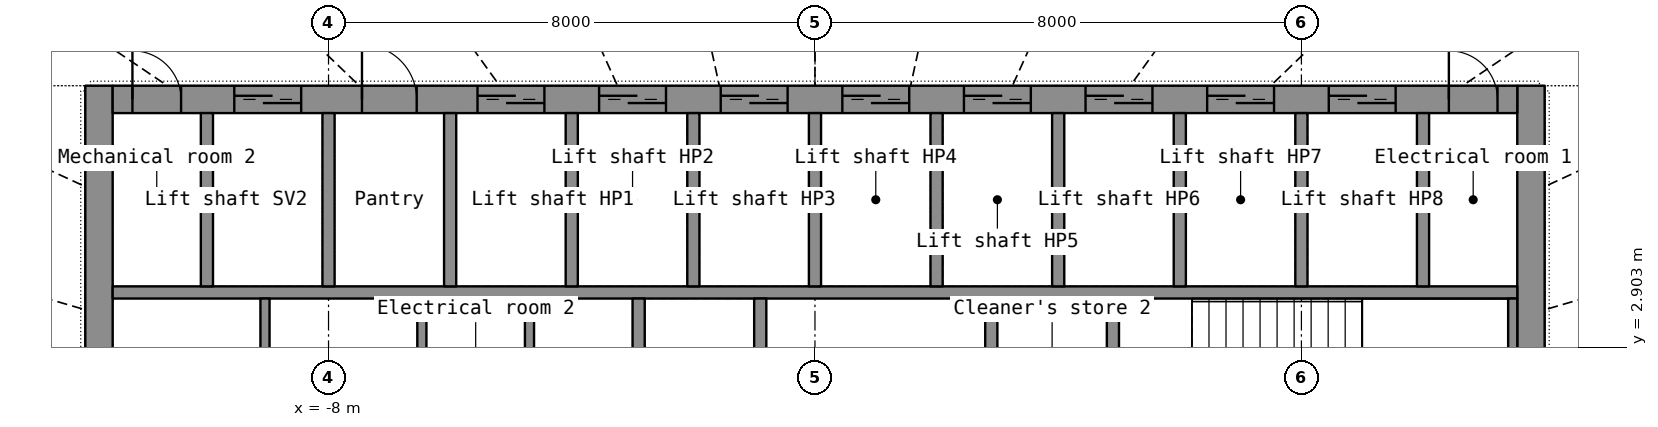
"""IFC4 building model, lengths in metres.
Left out: names, types, materials, properties, quantities, classifications, styles, units other than length and angle.
Written with IfcOpenShell. Run it as: python <this file> out.ifc"""

import sys

from ifc_helpers import new_model, si_unit, direction, frame, frame_2d, origin, place, context, subcontext, project, spatial, rectangle, extrude, element, fill, save


model = new_model("IFC4")
c1 = context("Model", 3, precision=1e-05, world=origin(), true_north=direction((0.0, 1.0)))
c2 = subcontext(c1, "Body", "Model", "MODEL_VIEW")
j1 = project(units=[si_unit("LENGTHUNIT", "METRE"), si_unit("PLANEANGLEUNIT", "RADIAN")], contexts=[c1])
p1 = place(None, origin())
s1 = spatial("IfcSite", under=j1, at=p1, CompositionType="ELEMENT")
p2 = place(p1, origin())
s2 = spatial("IfcBuilding", under=s1, at=p2, CompositionType="ELEMENT")
p3 = place(p2, frame((0.0, 0.0, 201.5)))
s3 = spatial("IfcBuildingStorey", under=s2, at=p3, CompositionType="ELEMENT", Elevation=201.5)
p4 = place(p3, frame((-11.775, -7.2, 0.0), z_axis=(0.0, 0.0, 1.0), x_axis=(0.0, 1.0, 0.0)))
e1 = element("IfcWall", 1, at=p4, inside=s3, PredefinedType="SHEAR", context=c2, shape_type="SweptSolid", body=[
    extrude(rectangle(XDim=14.4, YDim=0.45, at=frame_2d((7.2, 0.0))), origin(), (0.0, 0.0, 1.0), 3.3),
])
p5 = place(p4, frame((6.5, 0.0, 0.0)))
e2 = element("IfcOpeningElement", 2, at=p5, cuts=e1, PredefinedType="OPENING", context=c2, shape_type="SweptSolid", body=[
    extrude(rectangle(XDim=1.4, YDim=2.2, at=frame_2d((0.7, 1.1))), frame((0.0, 0.235, 0.0), z_axis=(0.0, -1.0, 0.0), x_axis=(1.0, 0.0, 0.0)), (0.0, 0.0, 1.0), 0.47),
])
p6 = place(p3, frame((11.775, -7.2, 0.0), z_axis=(0.0, 0.0, 1.0), x_axis=(0.0, 1.0, 0.0)))
e3 = element("IfcWall", 3, at=p6, inside=s3, PredefinedType="SHEAR", context=c2, shape_type="SweptSolid", body=[
    extrude(rectangle(XDim=14.4, YDim=0.45, at=frame_2d((7.2, 0.0))), origin(), (0.0, 0.0, 1.0), 3.3),
])
p7 = place(p6, frame((6.5, 0.0, 0.0)))
e4 = element("IfcOpeningElement", 4, at=p7, cuts=e3, PredefinedType="OPENING", context=c2, shape_type="SweptSolid", body=[
    extrude(rectangle(XDim=1.4, YDim=2.2, at=frame_2d((0.7, 1.1))), frame((0.0, 0.235, 0.0), z_axis=(0.0, -1.0, 0.0), x_axis=(1.0, 0.0, 0.0)), (0.0, 0.0, 1.0), 0.47),
])
p8 = place(p3, frame((-11.55, 6.975, 0.0), z_axis=(0.0, 0.0, 1.0), x_axis=(1.0, 0.0, 0.0)))
e5 = element("IfcWall", 5, at=p8, inside=s3, PredefinedType="SHEAR", context=c2, shape_type="SweptSolid", body=[
    extrude(rectangle(XDim=23.1, YDim=0.45, at=frame_2d((11.55, 0.0))), origin(), (0.0, 0.0, 1.0), 3.3),
])
p9 = place(p8, frame((2.0, 0.0, 0.0)))
e6 = element("IfcOpeningElement", 6, at=p9, cuts=e5, PredefinedType="OPENING", context=c2, shape_type="SweptSolid", body=[
    extrude(rectangle(XDim=1.1, YDim=2.2, at=frame_2d((0.55, 1.1))), frame((0.0, 0.235, 0.0), z_axis=(0.0, -1.0, 0.0), x_axis=(1.0, 0.0, 0.0)), (0.0, 0.0, 1.0), 0.47),
])
p10 = place(p8, frame((6.0, 0.0, 0.0)))
e7 = element("IfcOpeningElement", 7, at=p10, cuts=e5, PredefinedType="OPENING", context=c2, shape_type="SweptSolid", body=[
    extrude(rectangle(XDim=1.1, YDim=2.2, at=frame_2d((0.55, 1.1))), frame((0.0, 0.235, 0.0), z_axis=(0.0, -1.0, 0.0), x_axis=(1.0, 0.0, 0.0)), (0.0, 0.0, 1.0), 0.47),
])
p11 = place(p8, frame((8.0, 0.0, 0.0)))
e8 = element("IfcOpeningElement", 8, at=p11, cuts=e5, PredefinedType="OPENING", context=c2, shape_type="SweptSolid", body=[
    extrude(rectangle(XDim=1.1, YDim=2.2, at=frame_2d((0.55, 1.1))), frame((0.0, 0.235, 0.0), z_axis=(0.0, -1.0, 0.0), x_axis=(1.0, 0.0, 0.0)), (0.0, 0.0, 1.0), 0.47),
])
p12 = place(p8, frame((10.0, 0.0, 0.0)))
e9 = element("IfcOpeningElement", 9, at=p12, cuts=e5, PredefinedType="OPENING", context=c2, shape_type="SweptSolid", body=[
    extrude(rectangle(XDim=1.1, YDim=2.2, at=frame_2d((0.55, 1.1))), frame((0.0, 0.235, 0.0), z_axis=(0.0, -1.0, 0.0), x_axis=(1.0, 0.0, 0.0)), (0.0, 0.0, 1.0), 0.47),
])
p13 = place(p8, frame((12.0, 0.0, 0.0)))
e10 = element("IfcOpeningElement", 10, at=p13, cuts=e5, PredefinedType="OPENING", context=c2, shape_type="SweptSolid", body=[
    extrude(rectangle(XDim=1.1, YDim=2.2, at=frame_2d((0.55, 1.1))), frame((0.0, 0.235, 0.0), z_axis=(0.0, -1.0, 0.0), x_axis=(1.0, 0.0, 0.0)), (0.0, 0.0, 1.0), 0.47),
])
p14 = place(p8, frame((14.0, 0.0, 0.0)))
e11 = element("IfcOpeningElement", 11, at=p14, cuts=e5, PredefinedType="OPENING", context=c2, shape_type="SweptSolid", body=[
    extrude(rectangle(XDim=1.1, YDim=2.2, at=frame_2d((0.55, 1.1))), frame((0.0, 0.235, 0.0), z_axis=(0.0, -1.0, 0.0), x_axis=(1.0, 0.0, 0.0)), (0.0, 0.0, 1.0), 0.47),
])
p15 = place(p8, frame((16.0, 0.0, 0.0)))
e12 = element("IfcOpeningElement", 12, at=p15, cuts=e5, PredefinedType="OPENING", context=c2, shape_type="SweptSolid", body=[
    extrude(rectangle(XDim=1.1, YDim=2.2, at=frame_2d((0.55, 1.1))), frame((0.0, 0.235, 0.0), z_axis=(0.0, -1.0, 0.0), x_axis=(1.0, 0.0, 0.0)), (0.0, 0.0, 1.0), 0.47),
])
p16 = place(p8, frame((18.0, 0.0, 0.0)))
e13 = element("IfcOpeningElement", 13, at=p16, cuts=e5, PredefinedType="OPENING", context=c2, shape_type="SweptSolid", body=[
    extrude(rectangle(XDim=1.1, YDim=2.2, at=frame_2d((0.55, 1.1))), frame((0.0, 0.235, 0.0), z_axis=(0.0, -1.0, 0.0), x_axis=(1.0, 0.0, 0.0)), (0.0, 0.0, 1.0), 0.47),
])
p17 = place(p8, frame((20.0, 0.0, 0.0)))
e14 = element("IfcOpeningElement", 14, at=p17, cuts=e5, PredefinedType="OPENING", context=c2, shape_type="SweptSolid", body=[
    extrude(rectangle(XDim=1.1, YDim=2.2, at=frame_2d((0.55, 1.1))), frame((0.0, 0.235, 0.0), z_axis=(0.0, -1.0, 0.0), x_axis=(1.0, 0.0, 0.0)), (0.0, 0.0, 1.0), 0.47),
])
p18 = place(p8, frame((4.1, 0.0, 0.0)))
e15 = element("IfcOpeningElement", 15, at=p18, cuts=e5, PredefinedType="OPENING", context=c2, shape_type="SweptSolid", body=[
    extrude(rectangle(XDim=0.9, YDim=2.1, at=frame_2d((0.45, 1.05))), frame((0.0, 0.235, 0.0), z_axis=(0.0, -1.0, 0.0), x_axis=(1.0, 0.0, 0.0)), (0.0, 0.0, 1.0), 0.47),
])
p19 = place(p8, frame((0.325, 0.0, 0.0)))
e16 = element("IfcOpeningElement", 16, at=p19, cuts=e5, PredefinedType="OPENING", context=c2, shape_type="SweptSolid", body=[
    extrude(rectangle(XDim=0.8, YDim=2.05, at=frame_2d((0.4, 1.025))), frame((0.0, 0.235, 0.0), z_axis=(0.0, -1.0, 0.0), x_axis=(1.0, 0.0, 0.0)), (0.0, 0.0, 1.0), 0.47),
])
p20 = place(p8, frame((21.975, 0.0, 0.0)))
e17 = element("IfcOpeningElement", 17, at=p20, cuts=e5, PredefinedType="OPENING", context=c2, shape_type="SweptSolid", body=[
    extrude(rectangle(XDim=0.8, YDim=2.05, at=frame_2d((0.4, 1.025))), frame((0.0, 0.235, 0.0), z_axis=(0.0, -1.0, 0.0), x_axis=(1.0, 0.0, 0.0)), (0.0, 0.0, 1.0), 0.47),
])
p21 = place(p3, frame((-11.55, 3.8, 0.0), z_axis=(0.0, 0.0, 1.0), x_axis=(1.0, 0.0, 0.0)))
e18 = element("IfcWall", 18, at=p21, inside=s3, PredefinedType="SHEAR", context=c2, shape_type="SweptSolid", body=[
    extrude(rectangle(XDim=23.1, YDim=0.2, at=frame_2d((11.55, 0.0))), origin(), (0.0, 0.0, 1.0), 3.3),
])
for number, where, z_axis, x_axis in (
    (19, (-10.0, 3.9, 0.0), (0.0, 0.0, 1.0), (0.0, 1.0, 0.0)),
    (20, (-8.0, 3.9, 0.0), (0.0, 0.0, 1.0), (0.0, 1.0, 0.0)),
    (21, (-6.0, 3.9, 0.0), (0.0, 0.0, 1.0), (0.0, 1.0, 0.0)),
    (22, (-4.0, 3.9, 0.0), (0.0, 0.0, 1.0), (0.0, 1.0, 0.0)),
    (23, (-2.0, 3.9, 0.0), (0.0, 0.0, 1.0), (0.0, 1.0, 0.0)),
    (24, (0.0, 3.9, 0.0), (0.0, 0.0, 1.0), (0.0, 1.0, 0.0)),
    (25, (2.0, 3.9, 0.0), (0.0, 0.0, 1.0), (0.0, 1.0, 0.0)),
    (26, (4.0, 3.9, 0.0), (0.0, 0.0, 1.0), (0.0, 1.0, 0.0)),
    (27, (6.0, 3.9, 0.0), (0.0, 0.0, 1.0), (0.0, 1.0, 0.0)),
    (28, (8.0, 3.9, 0.0), (0.0, 0.0, 1.0), (0.0, 1.0, 0.0)),
    (29, (10.0, 3.9, 0.0), (0.0, 0.0, 1.0), (0.0, 1.0, 0.0)),
):
    element("IfcWall", number, at=place(p3, frame(where, z_axis=z_axis, x_axis=x_axis)), inside=s3, PredefinedType="SHEAR", context=c2, shape_type="SweptSolid", body=[
        extrude(rectangle(XDim=2.85, YDim=0.2, at=frame_2d((1.425, 0.0))), origin(), (0.0, 0.0, 1.0), 3.3),
    ])
p22 = place(p3, frame((-2.9, -3.7, 0.0), z_axis=(0.0, 0.0, 1.0), x_axis=(0.0, 1.0, 0.0)))
e30 = element("IfcWall", 30, at=p22, inside=s3, PredefinedType="SHEAR", context=c2, shape_type="SweptSolid", body=[
    extrude(rectangle(XDim=7.4, YDim=0.2, at=frame_2d((3.7, 0.0))), origin(), (0.0, 0.0, 1.0), 3.3),
])
p23 = place(p22, frame((3.1, 0.0, 0.0)))
e31 = element("IfcOpeningElement", 31, at=p23, cuts=e30, PredefinedType="OPENING", context=c2, shape_type="SweptSolid", body=[
    extrude(rectangle(XDim=1.2, YDim=2.2, at=frame_2d((0.6, 1.1))), frame((0.0, 0.11, 0.0), z_axis=(0.0, -1.0, 0.0), x_axis=(1.0, 0.0, 0.0)), (0.0, 0.0, 1.0), 0.22),
])
p24 = place(p3, frame((2.9, -3.7, 0.0), z_axis=(0.0, 0.0, 1.0), x_axis=(0.0, 1.0, 0.0)))
e32 = element("IfcWall", 32, at=p24, inside=s3, PredefinedType="SHEAR", context=c2, shape_type="SweptSolid", body=[
    extrude(rectangle(XDim=7.4, YDim=0.2, at=frame_2d((3.7, 0.0))), origin(), (0.0, 0.0, 1.0), 3.3),
])
p25 = place(p24, frame((3.1, 0.0, 0.0)))
e33 = element("IfcOpeningElement", 33, at=p25, cuts=e32, PredefinedType="OPENING", context=c2, shape_type="SweptSolid", body=[
    extrude(rectangle(XDim=1.2, YDim=2.2, at=frame_2d((0.6, 1.1))), frame((0.0, 0.11, 0.0), z_axis=(0.0, -1.0, 0.0), x_axis=(1.0, 0.0, 0.0)), (0.0, 0.0, 1.0), 0.22),
])
p26 = place(p3, frame((-0.9, 1.35, 0.0), z_axis=(0.0, 0.0, 1.0), x_axis=(0.0, 1.0, 0.0)))
e34 = element("IfcWall", 34, at=p26, inside=s3, PredefinedType="SHEAR", context=c2, shape_type="SweptSolid", body=[
    extrude(rectangle(XDim=2.35, YDim=0.2, at=frame_2d((1.175, 0.0))), origin(), (0.0, 0.0, 1.0), 3.3),
])
p27 = place(p3, frame((11.475, 1.35, 0.0), z_axis=(0.0, 0.0, 1.0), x_axis=(0.0, 1.0, 0.0)))
e35 = element("IfcWall", 35, at=p27, inside=s3, PredefinedType="SHEAR", context=c2, shape_type="SweptSolid", body=[
    extrude(rectangle(XDim=2.35, YDim=0.15, at=frame_2d((1.175, 0.0))), origin(), (0.0, 0.0, 1.0), 3.3),
])
p28 = place(p3, frame((4.9, 1.35, 0.0), z_axis=(0.0, 0.0, 1.0), x_axis=(0.0, 1.0, 0.0)))
e36 = element("IfcWall", 36, at=p28, inside=s3, PredefinedType="SHEAR", context=c2, shape_type="SweptSolid", body=[
    extrude(rectangle(XDim=2.35, YDim=0.2, at=frame_2d((1.175, 0.0))), origin(), (0.0, 0.0, 1.0), 3.3),
])
for number, where, z_axis, x_axis in (
    (37, (-9.045, 1.35, 0.0), (0.0, 0.0, 1.0), (0.0, 1.0, 0.0)),
    (38, (-6.465, 1.35, 0.0), (0.0, 0.0, 1.0), (0.0, 1.0, 0.0)),
    (39, (-4.695, 1.35, 0.0), (0.0, 0.0, 1.0), (0.0, 1.0, 0.0)),
):
    element("IfcWall", number, at=place(p3, frame(where, z_axis=z_axis, x_axis=x_axis)), inside=s3, PredefinedType="PARTITIONING", context=c2, shape_type="SweptSolid", body=[
        extrude(rectangle(XDim=2.35, YDim=0.15, at=frame_2d((1.175, 0.0))), origin(), (0.0, 0.0, 1.0), 3.3),
    ])
p29 = place(p9, origin())
e40 = element("IfcDoor", 40, at=p29, inside=s3, OperationType="DOUBLE_DOOR_SLIDING", PredefinedType="DOOR", context=c2, shape_type="SweptSolid", body=[
    extrude(rectangle(XDim=1.1, YDim=2.2, at=frame_2d((0.55, 1.1))), frame((0.0, 0.025, 0.0), z_axis=(0.0, -1.0, 0.0), x_axis=(1.0, 0.0, 0.0)), (0.0, 0.0, 1.0), 0.05),
])
fill(e6, e40)
p30 = place(p10, origin())
e41 = element("IfcDoor", 41, at=p30, inside=s3, OperationType="DOUBLE_DOOR_SLIDING", PredefinedType="DOOR", context=c2, shape_type="SweptSolid", body=[
    extrude(rectangle(XDim=1.1, YDim=2.2, at=frame_2d((0.55, 1.1))), frame((0.0, 0.025, 0.0), z_axis=(0.0, -1.0, 0.0), x_axis=(1.0, 0.0, 0.0)), (0.0, 0.0, 1.0), 0.05),
])
fill(e7, e41)
p31 = place(p11, origin())
e42 = element("IfcDoor", 42, at=p31, inside=s3, OperationType="DOUBLE_DOOR_SLIDING", PredefinedType="DOOR", context=c2, shape_type="SweptSolid", body=[
    extrude(rectangle(XDim=1.1, YDim=2.2, at=frame_2d((0.55, 1.1))), frame((0.0, 0.025, 0.0), z_axis=(0.0, -1.0, 0.0), x_axis=(1.0, 0.0, 0.0)), (0.0, 0.0, 1.0), 0.05),
])
fill(e8, e42)
p32 = place(p12, origin())
e43 = element("IfcDoor", 43, at=p32, inside=s3, OperationType="DOUBLE_DOOR_SLIDING", PredefinedType="DOOR", context=c2, shape_type="SweptSolid", body=[
    extrude(rectangle(XDim=1.1, YDim=2.2, at=frame_2d((0.55, 1.1))), frame((0.0, 0.025, 0.0), z_axis=(0.0, -1.0, 0.0), x_axis=(1.0, 0.0, 0.0)), (0.0, 0.0, 1.0), 0.05),
])
fill(e9, e43)
p33 = place(p13, origin())
e44 = element("IfcDoor", 44, at=p33, inside=s3, OperationType="DOUBLE_DOOR_SLIDING", PredefinedType="DOOR", context=c2, shape_type="SweptSolid", body=[
    extrude(rectangle(XDim=1.1, YDim=2.2, at=frame_2d((0.55, 1.1))), frame((0.0, 0.025, 0.0), z_axis=(0.0, -1.0, 0.0), x_axis=(1.0, 0.0, 0.0)), (0.0, 0.0, 1.0), 0.05),
])
fill(e10, e44)
p34 = place(p14, origin())
e45 = element("IfcDoor", 45, at=p34, inside=s3, OperationType="DOUBLE_DOOR_SLIDING", PredefinedType="DOOR", context=c2, shape_type="SweptSolid", body=[
    extrude(rectangle(XDim=1.1, YDim=2.2, at=frame_2d((0.55, 1.1))), frame((0.0, 0.025, 0.0), z_axis=(0.0, -1.0, 0.0), x_axis=(1.0, 0.0, 0.0)), (0.0, 0.0, 1.0), 0.05),
])
fill(e11, e45)
p35 = place(p15, origin())
e46 = element("IfcDoor", 46, at=p35, inside=s3, OperationType="DOUBLE_DOOR_SLIDING", PredefinedType="DOOR", context=c2, shape_type="SweptSolid", body=[
    extrude(rectangle(XDim=1.1, YDim=2.2, at=frame_2d((0.55, 1.1))), frame((0.0, 0.025, 0.0), z_axis=(0.0, -1.0, 0.0), x_axis=(1.0, 0.0, 0.0)), (0.0, 0.0, 1.0), 0.05),
])
fill(e12, e46)
p36 = place(p16, origin())
e47 = element("IfcDoor", 47, at=p36, inside=s3, OperationType="DOUBLE_DOOR_SLIDING", PredefinedType="DOOR", context=c2, shape_type="SweptSolid", body=[
    extrude(rectangle(XDim=1.1, YDim=2.2, at=frame_2d((0.55, 1.1))), frame((0.0, 0.025, 0.0), z_axis=(0.0, -1.0, 0.0), x_axis=(1.0, 0.0, 0.0)), (0.0, 0.0, 1.0), 0.05),
])
fill(e13, e47)
p37 = place(p17, origin())
e48 = element("IfcDoor", 48, at=p37, inside=s3, OperationType="DOUBLE_DOOR_SLIDING", PredefinedType="DOOR", context=c2, shape_type="SweptSolid", body=[
    extrude(rectangle(XDim=1.1, YDim=2.2, at=frame_2d((0.55, 1.1))), frame((0.0, 0.025, 0.0), z_axis=(0.0, -1.0, 0.0), x_axis=(1.0, 0.0, 0.0)), (0.0, 0.0, 1.0), 0.05),
])
fill(e14, e48)
p38 = place(p18, origin())
e49 = element("IfcDoor", 49, at=p38, inside=s3, OperationType="SINGLE_SWING_LEFT", PredefinedType="DOOR", context=c2, shape_type="SweptSolid", body=[
    extrude(rectangle(XDim=0.9, YDim=2.1, at=frame_2d((0.45, 1.05))), frame((0.0, 0.025, 0.0), z_axis=(0.0, -1.0, 0.0), x_axis=(1.0, 0.0, 0.0)), (0.0, 0.0, 1.0), 0.05),
])
fill(e15, e49)
p39 = place(p19, origin())
e50 = element("IfcDoor", 50, at=p39, inside=s3, OperationType="SINGLE_SWING_LEFT", PredefinedType="DOOR", context=c2, shape_type="SweptSolid", body=[
    extrude(rectangle(XDim=0.8, YDim=2.05, at=frame_2d((0.4, 1.025))), frame((0.0, 0.025, 0.0), z_axis=(0.0, -1.0, 0.0), x_axis=(1.0, 0.0, 0.0)), (0.0, 0.0, 1.0), 0.05),
])
fill(e16, e50)
p40 = place(p20, origin())
e51 = element("IfcDoor", 51, at=p40, inside=s3, OperationType="SINGLE_SWING_LEFT", PredefinedType="DOOR", context=c2, shape_type="SweptSolid", body=[
    extrude(rectangle(XDim=0.8, YDim=2.05, at=frame_2d((0.4, 1.025))), frame((0.0, 0.025, 0.0), z_axis=(0.0, -1.0, 0.0), x_axis=(1.0, 0.0, 0.0)), (0.0, 0.0, 1.0), 0.05),
])
fill(e17, e51)
save(model, sys.argv[1])
